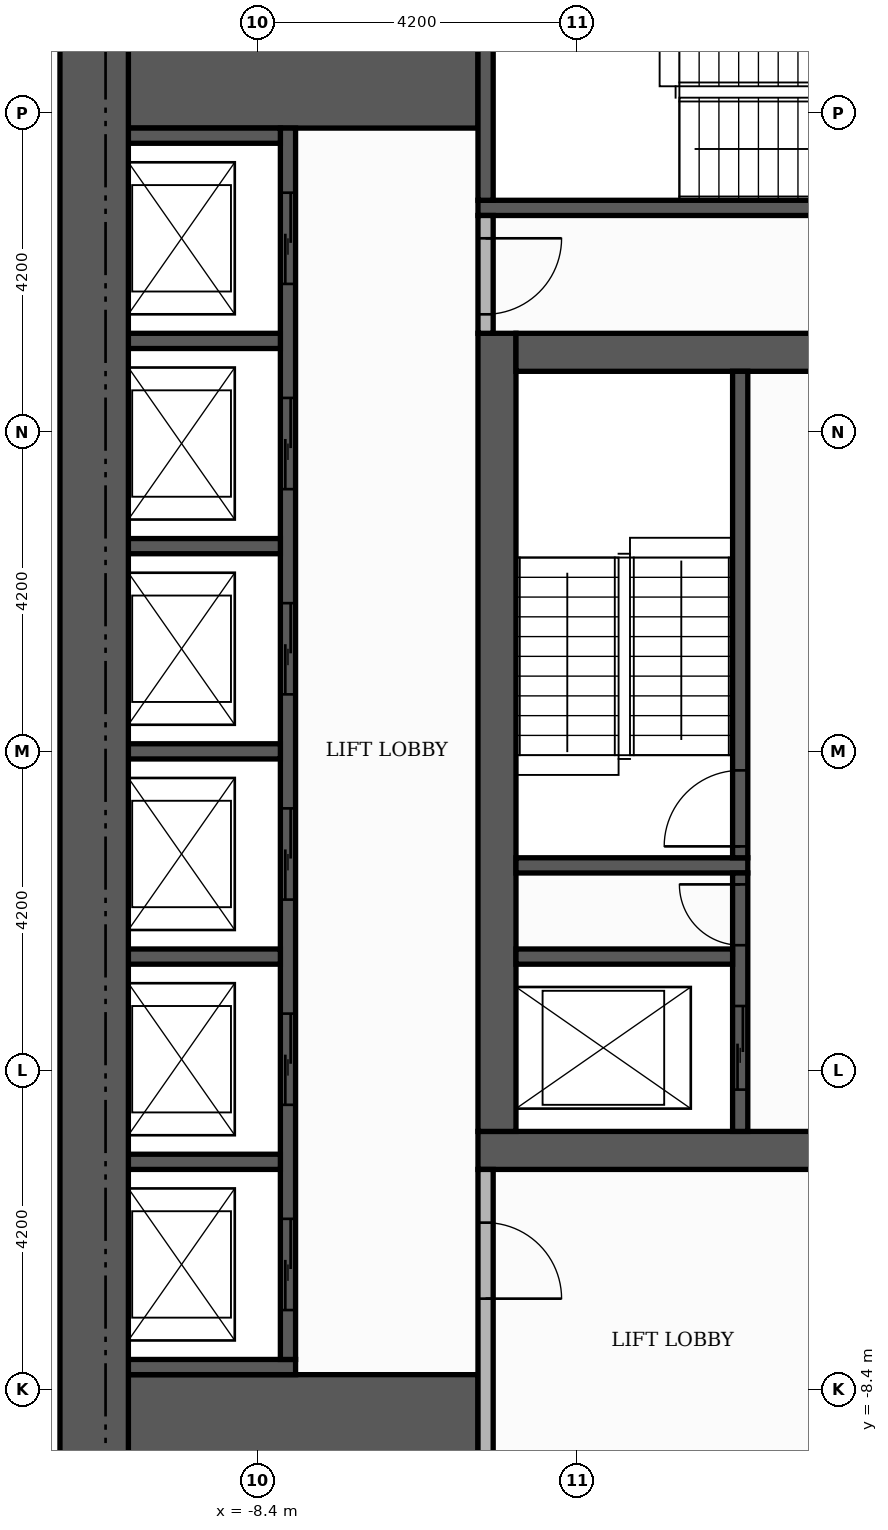
"""IFC4 building model, lengths in metres.
Left out: names, types, materials, properties, quantities, classifications, styles, units other than length and angle.
Written with IfcOpenShell. Run it as: python <this file> out.ifc"""

import sys

from ifc_helpers import new_model, si_unit, direction, frame, frame_2d, origin, place, context, subcontext, project, spatial, rectangle, extrude, element, fill, save


model = new_model("IFC4")
c1 = context("Model", 3, precision=1e-05, world=origin(), true_north=direction((0.0, 1.0)))
c2 = subcontext(c1, "Body", "Model", "MODEL_VIEW")
j1 = project(units=[si_unit("LENGTHUNIT", "METRE"), si_unit("PLANEANGLEUNIT", "RADIAN")], contexts=[c1])
p1 = place(None, origin())
s1 = spatial("IfcSite", under=j1, at=p1, CompositionType="ELEMENT")
p2 = place(p1, origin())
s2 = spatial("IfcBuilding", under=s1, at=p2, CompositionType="ELEMENT")
p3 = place(p2, frame((0.0, 0.0, 46.5)))
s3 = spatial("IfcBuildingStorey", under=s2, at=p3, CompositionType="ELEMENT", Elevation=46.5)
p4 = place(p3, frame((-5.5, -5.25, 0.0), z_axis=(0.0, 0.0, 1.0), x_axis=(1.0, 0.0, 0.0)))
e1 = element("IfcWall", 1, at=p4, inside=s3, PredefinedType="SHEAR", context=c2, shape_type="SweptSolid", body=[
    extrude(rectangle(XDim=11.0, YDim=0.5, at=frame_2d((5.5, 0.0))), origin(), (0.0, 0.0, 1.0), 3.48),
])
p5 = place(p4, frame((4.9, 0.0, 0.0)))
e2 = element("IfcOpeningElement", 2, at=p5, cuts=e1, PredefinedType="OPENING", context=c2, shape_type="SweptSolid", body=[
    extrude(rectangle(XDim=1.2, YDim=2.1, at=frame_2d((0.6, 1.05))), frame((0.0, 0.26, 0.0), z_axis=(0.0, -1.0, 0.0), x_axis=(1.0, 0.0, 0.0)), (0.0, 0.0, 1.0), 0.52),
])
p6 = place(p3, frame((-5.25, -5.0, 0.0), z_axis=(0.0, 0.0, 1.0), x_axis=(0.0, 1.0, 0.0)))
e3 = element("IfcWall", 3, at=p6, inside=s3, PredefinedType="SHEAR", context=c2, shape_type="SweptSolid", body=[
    extrude(rectangle(XDim=10.5, YDim=0.5, at=frame_2d((5.25, 0.0))), origin(), (0.0, 0.0, 1.0), 3.48),
])
p7 = place(p3, frame((-5.0, 5.25, 0.0), z_axis=(0.0, 0.0, 1.0), x_axis=(1.0, 0.0, 0.0)))
e4 = element("IfcWall", 4, at=p7, inside=s3, PredefinedType="SHEAR", context=c2, shape_type="SweptSolid", body=[
    extrude(rectangle(XDim=10.0, YDim=0.5, at=frame_2d((5.0, 0.0))), origin(), (0.0, 0.0, 1.0), 3.48),
])
p8 = place(p7, frame((4.4, 0.0, 0.0)))
e5 = element("IfcOpeningElement", 5, at=p8, cuts=e4, PredefinedType="OPENING", context=c2, shape_type="SweptSolid", body=[
    extrude(rectangle(XDim=1.2, YDim=2.1, at=frame_2d((0.6, 1.05))), frame((0.0, 0.26, 0.0), z_axis=(0.0, -1.0, 0.0), x_axis=(1.0, 0.0, 0.0)), (0.0, 0.0, 1.0), 0.52),
])
for number, where, z_axis, x_axis in (
    (6, (-10.1, -9.15, 0.0), (0.0, 0.0, 1.0), (1.0, 0.0, 0.0)),
    (7, (-10.1, 9.15, 0.0), (0.0, 0.0, 1.0), (1.0, 0.0, 0.0)),
):
    element("IfcWall", number, at=place(p3, frame(where, z_axis=z_axis, x_axis=x_axis)), inside=s3, PredefinedType="SHEAR", context=c2, shape_type="SweptSolid", body=[
        extrude(rectangle(XDim=4.6, YDim=1.9, at=frame_2d((2.3, 0.0))), origin(), (0.0, 0.0, 1.0), 3.48),
    ])
p9 = place(p3, frame((-5.0, -1.5, 0.0), z_axis=(0.0, 0.0, 1.0), x_axis=(1.0, 0.0, 0.0)))
e8 = element("IfcWall", 8, at=p9, inside=s3, PredefinedType="SHEAR", context=c2, shape_type="SweptSolid", body=[
    extrude(rectangle(XDim=3.05, YDim=0.2, at=frame_2d((1.525, 0.0))), origin(), (0.0, 0.0, 1.0), 3.48),
])
p10 = place(p3, frame((-2.05, -1.4, 0.0), z_axis=(0.0, 0.0, 1.0), x_axis=(0.0, 1.0, 0.0)))
e9 = element("IfcWall", 9, at=p10, inside=s3, PredefinedType="SHEAR", context=c2, shape_type="SweptSolid", body=[
    extrude(rectangle(XDim=6.4, YDim=0.2, at=frame_2d((3.2, 0.0))), origin(), (0.0, 0.0, 1.0), 3.48),
])
p11 = place(p10, frame((0.15, 0.0, 0.0)))
e10 = element("IfcOpeningElement", 10, at=p11, cuts=e9, PredefinedType="OPENING", context=c2, shape_type="SweptSolid", body=[
    extrude(rectangle(XDim=1.0, YDim=2.1, at=frame_2d((0.5, 1.05))), frame((0.0, 0.11, 0.0), z_axis=(0.0, -1.0, 0.0), x_axis=(1.0, 0.0, 0.0)), (0.0, 0.0, 1.0), 0.22),
])
p12 = place(p3, frame((-5.5, 7.15, 0.0), z_axis=(0.0, 0.0, 1.0), x_axis=(1.0, 0.0, 0.0)))
e11 = element("IfcWall", 11, at=p12, inside=s3, PredefinedType="SHEAR", context=c2, shape_type="SweptSolid", body=[
    extrude(rectangle(XDim=6.8, YDim=0.2, at=frame_2d((3.4, 0.0))), origin(), (0.0, 0.0, 1.0), 3.48),
])
p13 = place(p3, frame((-5.4, 7.25, 0.0), z_axis=(0.0, 0.0, 1.0), x_axis=(0.0, 1.0, 0.0)))
e12 = element("IfcWall", 12, at=p13, inside=s3, PredefinedType="SHEAR", context=c2, shape_type="SweptSolid", body=[
    extrude(rectangle(XDim=2.85, YDim=0.2, at=frame_2d((1.425, 0.0))), origin(), (0.0, 0.0, 1.0), 3.48),
])
p14 = place(p3, frame((-10.1, -8.1, 0.0), z_axis=(0.0, 0.0, 1.0), x_axis=(1.0, 0.0, 0.0)))
e13 = element("IfcWall", 13, at=p14, inside=s3, PredefinedType="SHEAR", context=c2, shape_type="SweptSolid", body=[
    extrude(rectangle(XDim=2.2, YDim=0.2, at=frame_2d((1.1, 0.0))), origin(), (0.0, 0.0, 1.0), 3.48),
])
p15 = place(p3, frame((-8.0, -8.0, 0.0), z_axis=(0.0, 0.0, 1.0), x_axis=(0.0, 1.0, 0.0)))
e14 = element("IfcWall", 14, at=p15, inside=s3, PredefinedType="SHEAR", context=c2, shape_type="SweptSolid", body=[
    extrude(rectangle(XDim=16.2, YDim=0.2, at=frame_2d((8.1, 0.0))), origin(), (0.0, 0.0, 1.0), 3.48),
])
p16 = place(p15, frame((0.65, 0.0, 0.0)))
e15 = element("IfcOpeningElement", 15, at=p16, cuts=e14, PredefinedType="OPENING", context=c2, shape_type="SweptSolid", body=[
    extrude(rectangle(XDim=1.2, YDim=2.1, at=frame_2d((0.6, 1.05))), frame((0.0, 0.11, 0.0), z_axis=(0.0, -1.0, 0.0), x_axis=(1.0, 0.0, 0.0)), (0.0, 0.0, 1.0), 0.22),
])
p17 = place(p15, frame((3.35, 0.0, 0.0)))
e16 = element("IfcOpeningElement", 16, at=p17, cuts=e14, PredefinedType="OPENING", context=c2, shape_type="SweptSolid", body=[
    extrude(rectangle(XDim=1.2, YDim=2.1, at=frame_2d((0.6, 1.05))), frame((0.0, 0.11, 0.0), z_axis=(0.0, -1.0, 0.0), x_axis=(1.0, 0.0, 0.0)), (0.0, 0.0, 1.0), 0.22),
])
p18 = place(p15, frame((6.05, 0.0, 0.0)))
e17 = element("IfcOpeningElement", 17, at=p18, cuts=e14, PredefinedType="OPENING", context=c2, shape_type="SweptSolid", body=[
    extrude(rectangle(XDim=1.2, YDim=2.1, at=frame_2d((0.6, 1.05))), frame((0.0, 0.11, 0.0), z_axis=(0.0, -1.0, 0.0), x_axis=(1.0, 0.0, 0.0)), (0.0, 0.0, 1.0), 0.22),
])
p19 = place(p15, frame((8.75, 0.0, 0.0)))
e18 = element("IfcOpeningElement", 18, at=p19, cuts=e14, PredefinedType="OPENING", context=c2, shape_type="SweptSolid", body=[
    extrude(rectangle(XDim=1.2, YDim=2.1, at=frame_2d((0.6, 1.05))), frame((0.0, 0.11, 0.0), z_axis=(0.0, -1.0, 0.0), x_axis=(1.0, 0.0, 0.0)), (0.0, 0.0, 1.0), 0.22),
])
p20 = place(p15, frame((11.45, 0.0, 0.0)))
e19 = element("IfcOpeningElement", 19, at=p20, cuts=e14, PredefinedType="OPENING", context=c2, shape_type="SweptSolid", body=[
    extrude(rectangle(XDim=1.2, YDim=2.1, at=frame_2d((0.6, 1.05))), frame((0.0, 0.11, 0.0), z_axis=(0.0, -1.0, 0.0), x_axis=(1.0, 0.0, 0.0)), (0.0, 0.0, 1.0), 0.22),
])
p21 = place(p15, frame((14.15, 0.0, 0.0)))
e20 = element("IfcOpeningElement", 20, at=p21, cuts=e14, PredefinedType="OPENING", context=c2, shape_type="SweptSolid", body=[
    extrude(rectangle(XDim=1.2, YDim=2.1, at=frame_2d((0.6, 1.05))), frame((0.0, 0.11, 0.0), z_axis=(0.0, -1.0, 0.0), x_axis=(1.0, 0.0, 0.0)), (0.0, 0.0, 1.0), 0.22),
])
p22 = place(p3, frame((-10.1, -5.4, 0.0), z_axis=(0.0, 0.0, 1.0), x_axis=(1.0, 0.0, 0.0)))
e21 = element("IfcWall", 21, at=p22, inside=s3, PredefinedType="SHEAR", context=c2, shape_type="SweptSolid", body=[
    extrude(rectangle(XDim=2.0, YDim=0.2, at=frame_2d((1.0, 0.0))), origin(), (0.0, 0.0, 1.0), 3.48),
])
p23 = place(p3, frame((-2.05, -5.0, 0.0), z_axis=(0.0, 0.0, 1.0), x_axis=(0.0, 1.0, 0.0)))
e22 = element("IfcWall", 22, at=p23, inside=s3, PredefinedType="SHEAR", context=c2, shape_type="SweptSolid", body=[
    extrude(rectangle(XDim=3.4, YDim=0.2, at=frame_2d((1.7, 0.0))), origin(), (0.0, 0.0, 1.0), 3.48),
])
p24 = place(p23, frame((0.55, 0.0, 0.0)))
e23 = element("IfcOpeningElement", 23, at=p24, cuts=e22, PredefinedType="OPENING", context=c2, shape_type="SweptSolid", body=[
    extrude(rectangle(XDim=1.1, YDim=2.1, at=frame_2d((0.55, 1.05))), frame((0.0, 0.11, 0.0), z_axis=(0.0, -1.0, 0.0), x_axis=(1.0, 0.0, 0.0)), (0.0, 0.0, 1.0), 0.22),
])
p25 = place(p23, frame((2.45, 0.0, 0.0)))
e24 = element("IfcOpeningElement", 24, at=p25, cuts=e22, PredefinedType="OPENING", context=c2, shape_type="SweptSolid", body=[
    extrude(rectangle(XDim=0.8, YDim=2.1, at=frame_2d((0.4, 1.05))), frame((0.0, 0.11, 0.0), z_axis=(0.0, -1.0, 0.0), x_axis=(1.0, 0.0, 0.0)), (0.0, 0.0, 1.0), 0.22),
])
p26 = place(p3, frame((-10.1, -2.7, 0.0), z_axis=(0.0, 0.0, 1.0), x_axis=(1.0, 0.0, 0.0)))
e25 = element("IfcWall", 25, at=p26, inside=s3, PredefinedType="SHEAR", context=c2, shape_type="SweptSolid", body=[
    extrude(rectangle(XDim=2.0, YDim=0.2, at=frame_2d((1.0, 0.0))), origin(), (0.0, 0.0, 1.0), 3.48),
])
p27 = place(p3, frame((-5.0, -2.7, 0.0), z_axis=(0.0, 0.0, 1.0), x_axis=(1.0, 0.0, 0.0)))
e26 = element("IfcWall", 26, at=p27, inside=s3, PredefinedType="SHEAR", context=c2, shape_type="SweptSolid", body=[
    extrude(rectangle(XDim=2.85, YDim=0.2, at=frame_2d((1.425, 0.0))), origin(), (0.0, 0.0, 1.0), 3.48),
])
for number, where, z_axis, x_axis in (
    (27, (-10.1, 0.0, 0.0), (0.0, 0.0, 1.0), (1.0, 0.0, 0.0)),
    (28, (-10.1, 2.7, 0.0), (0.0, 0.0, 1.0), (1.0, 0.0, 0.0)),
    (29, (-10.1, 5.4, 0.0), (0.0, 0.0, 1.0), (1.0, 0.0, 0.0)),
    (30, (-10.1, 8.1, 0.0), (0.0, 0.0, 1.0), (1.0, 0.0, 0.0)),
):
    element("IfcWall", number, at=place(p3, frame(where, z_axis=z_axis, x_axis=x_axis)), inside=s3, PredefinedType="SHEAR", context=c2, shape_type="SweptSolid", body=[
        extrude(rectangle(XDim=2.0, YDim=0.2, at=frame_2d((1.0, 0.0))), origin(), (0.0, 0.0, 1.0), 3.48),
    ])
p28 = place(p3, frame((-10.55, -10.1, 0.0), z_axis=(0.0, 0.0, 1.0), x_axis=(0.0, 1.0, 0.0)))
e31 = element("IfcWall", 31, at=p28, inside=s3, PredefinedType="SHEAR", context=c2, shape_type="SweptSolid", body=[
    extrude(rectangle(XDim=20.2, YDim=0.9, at=frame_2d((10.1, 0.0))), origin(), (0.0, 0.0, 1.0), 3.48),
])
p29 = place(p3, frame((-5.4, -10.1, 0.0), z_axis=(0.0, 0.0, 1.0), x_axis=(0.0, 1.0, 0.0)))
e32 = element("IfcWall", 32, at=p29, inside=s3, PredefinedType="PARTITIONING", context=c2, shape_type="SweptSolid", body=[
    extrude(rectangle(XDim=4.6, YDim=0.2, at=frame_2d((2.3, 0.0))), origin(), (0.0, 0.0, 1.0), 3.48),
])
p30 = place(p29, frame((2.9, 0.0, 0.0)))
e33 = element("IfcOpeningElement", 33, at=p30, cuts=e32, PredefinedType="OPENING", context=c2, shape_type="SweptSolid", body=[
    extrude(rectangle(XDim=1.0, YDim=2.1, at=frame_2d((0.5, 1.05))), frame((0.0, 0.11, 0.0), z_axis=(0.0, -1.0, 0.0), x_axis=(1.0, 0.0, 0.0)), (0.0, 0.0, 1.0), 0.22),
])
p31 = place(p3, frame((-5.4, 5.5, 0.0), z_axis=(0.0, 0.0, 1.0), x_axis=(0.0, 1.0, 0.0)))
e34 = element("IfcWall", 34, at=p31, inside=s3, PredefinedType="PARTITIONING", context=c2, shape_type="SweptSolid", body=[
    extrude(rectangle(XDim=1.55, YDim=0.2, at=frame_2d((0.775, 0.0))), origin(), (0.0, 0.0, 1.0), 3.48),
])
p32 = place(p31, frame((0.25, 0.0, 0.0)))
e35 = element("IfcOpeningElement", 35, at=p32, cuts=e34, PredefinedType="OPENING", context=c2, shape_type="SweptSolid", body=[
    extrude(rectangle(XDim=1.0, YDim=2.1, at=frame_2d((0.5, 1.05))), frame((0.0, 0.11, 0.0), z_axis=(0.0, -1.0, 0.0), x_axis=(1.0, 0.0, 0.0)), (0.0, 0.0, 1.0), 0.22),
])
p33 = place(p16, origin())
e36 = element("IfcDoor", 36, at=p33, inside=s3, OperationType="SLIDING_TO_LEFT", PredefinedType="DOOR", context=c2, shape_type="SweptSolid", body=[
    extrude(rectangle(XDim=1.2, YDim=2.1, at=frame_2d((0.6, 1.05))), frame((0.0, 0.025, 0.0), z_axis=(0.0, -1.0, 0.0), x_axis=(1.0, 0.0, 0.0)), (0.0, 0.0, 1.0), 0.05),
])
fill(e15, e36)
p34 = place(p17, origin())
e37 = element("IfcDoor", 37, at=p34, inside=s3, OperationType="SLIDING_TO_LEFT", PredefinedType="DOOR", context=c2, shape_type="SweptSolid", body=[
    extrude(rectangle(XDim=1.2, YDim=2.1, at=frame_2d((0.6, 1.05))), frame((0.0, 0.025, 0.0), z_axis=(0.0, -1.0, 0.0), x_axis=(1.0, 0.0, 0.0)), (0.0, 0.0, 1.0), 0.05),
])
fill(e16, e37)
p35 = place(p18, origin())
e38 = element("IfcDoor", 38, at=p35, inside=s3, OperationType="SLIDING_TO_LEFT", PredefinedType="DOOR", context=c2, shape_type="SweptSolid", body=[
    extrude(rectangle(XDim=1.2, YDim=2.1, at=frame_2d((0.6, 1.05))), frame((0.0, 0.025, 0.0), z_axis=(0.0, -1.0, 0.0), x_axis=(1.0, 0.0, 0.0)), (0.0, 0.0, 1.0), 0.05),
])
fill(e17, e38)
p36 = place(p19, origin())
e39 = element("IfcDoor", 39, at=p36, inside=s3, OperationType="SLIDING_TO_LEFT", PredefinedType="DOOR", context=c2, shape_type="SweptSolid", body=[
    extrude(rectangle(XDim=1.2, YDim=2.1, at=frame_2d((0.6, 1.05))), frame((0.0, 0.025, 0.0), z_axis=(0.0, -1.0, 0.0), x_axis=(1.0, 0.0, 0.0)), (0.0, 0.0, 1.0), 0.05),
])
fill(e18, e39)
p37 = place(p20, origin())
e40 = element("IfcDoor", 40, at=p37, inside=s3, OperationType="SLIDING_TO_LEFT", PredefinedType="DOOR", context=c2, shape_type="SweptSolid", body=[
    extrude(rectangle(XDim=1.2, YDim=2.1, at=frame_2d((0.6, 1.05))), frame((0.0, 0.025, 0.0), z_axis=(0.0, -1.0, 0.0), x_axis=(1.0, 0.0, 0.0)), (0.0, 0.0, 1.0), 0.05),
])
fill(e19, e40)
p38 = place(p21, origin())
e41 = element("IfcDoor", 41, at=p38, inside=s3, OperationType="SLIDING_TO_LEFT", PredefinedType="DOOR", context=c2, shape_type="SweptSolid", body=[
    extrude(rectangle(XDim=1.2, YDim=2.1, at=frame_2d((0.6, 1.05))), frame((0.0, 0.025, 0.0), z_axis=(0.0, -1.0, 0.0), x_axis=(1.0, 0.0, 0.0)), (0.0, 0.0, 1.0), 0.05),
])
fill(e20, e41)
p39 = place(p24, origin())
e42 = element("IfcDoor", 42, at=p39, inside=s3, OperationType="SLIDING_TO_LEFT", PredefinedType="DOOR", context=c2, shape_type="SweptSolid", body=[
    extrude(rectangle(XDim=1.1, YDim=2.1, at=frame_2d((0.55, 1.05))), frame((0.0, 0.025, 0.0), z_axis=(0.0, -1.0, 0.0), x_axis=(1.0, 0.0, 0.0)), (0.0, 0.0, 1.0), 0.05),
])
fill(e23, e42)
p40 = place(p11, origin())
e43 = element("IfcDoor", 43, at=p40, inside=s3, OperationType="SINGLE_SWING_LEFT", PredefinedType="DOOR", context=c2, shape_type="SweptSolid", body=[
    extrude(rectangle(XDim=1.0, YDim=2.1, at=frame_2d((0.5, 1.05))), frame((0.0, 0.025, 0.0), z_axis=(0.0, -1.0, 0.0), x_axis=(1.0, 0.0, 0.0)), (0.0, 0.0, 1.0), 0.05),
])
fill(e10, e43)
p41 = place(p25, origin())
e44 = element("IfcDoor", 44, at=p41, inside=s3, OperationType="SINGLE_SWING_RIGHT", PredefinedType="DOOR", context=c2, shape_type="SweptSolid", body=[
    extrude(rectangle(XDim=0.8, YDim=2.1, at=frame_2d((0.4, 1.05))), frame((0.0, 0.025, 0.0), z_axis=(0.0, -1.0, 0.0), x_axis=(1.0, 0.0, 0.0)), (0.0, 0.0, 1.0), 0.05),
])
fill(e24, e44)
p42 = place(p32, frame((1.0, 0.0, 0.0), z_axis=(0.0, 0.0, 1.0), x_axis=(-1.0, 0.0, 0.0)))
e45 = element("IfcDoor", 45, at=p42, inside=s3, OperationType="SINGLE_SWING_RIGHT", PredefinedType="DOOR", context=c2, shape_type="SweptSolid", body=[
    extrude(rectangle(XDim=1.0, YDim=2.1, at=frame_2d((0.5, 1.05))), frame((0.0, 0.025, 0.0), z_axis=(0.0, -1.0, 0.0), x_axis=(1.0, 0.0, 0.0)), (0.0, 0.0, 1.0), 0.05),
])
fill(e35, e45)
p43 = place(p30, frame((1.0, 0.0, 0.0), z_axis=(0.0, 0.0, 1.0), x_axis=(-1.0, 0.0, 0.0)))
e46 = element("IfcDoor", 46, at=p43, inside=s3, OperationType="SINGLE_SWING_LEFT", PredefinedType="DOOR", context=c2, shape_type="SweptSolid", body=[
    extrude(rectangle(XDim=1.0, YDim=2.1, at=frame_2d((0.5, 1.05))), frame((0.0, 0.025, 0.0), z_axis=(0.0, -1.0, 0.0), x_axis=(1.0, 0.0, 0.0)), (0.0, 0.0, 1.0), 0.05),
])
fill(e33, e46)
save(model, sys.argv[1])
